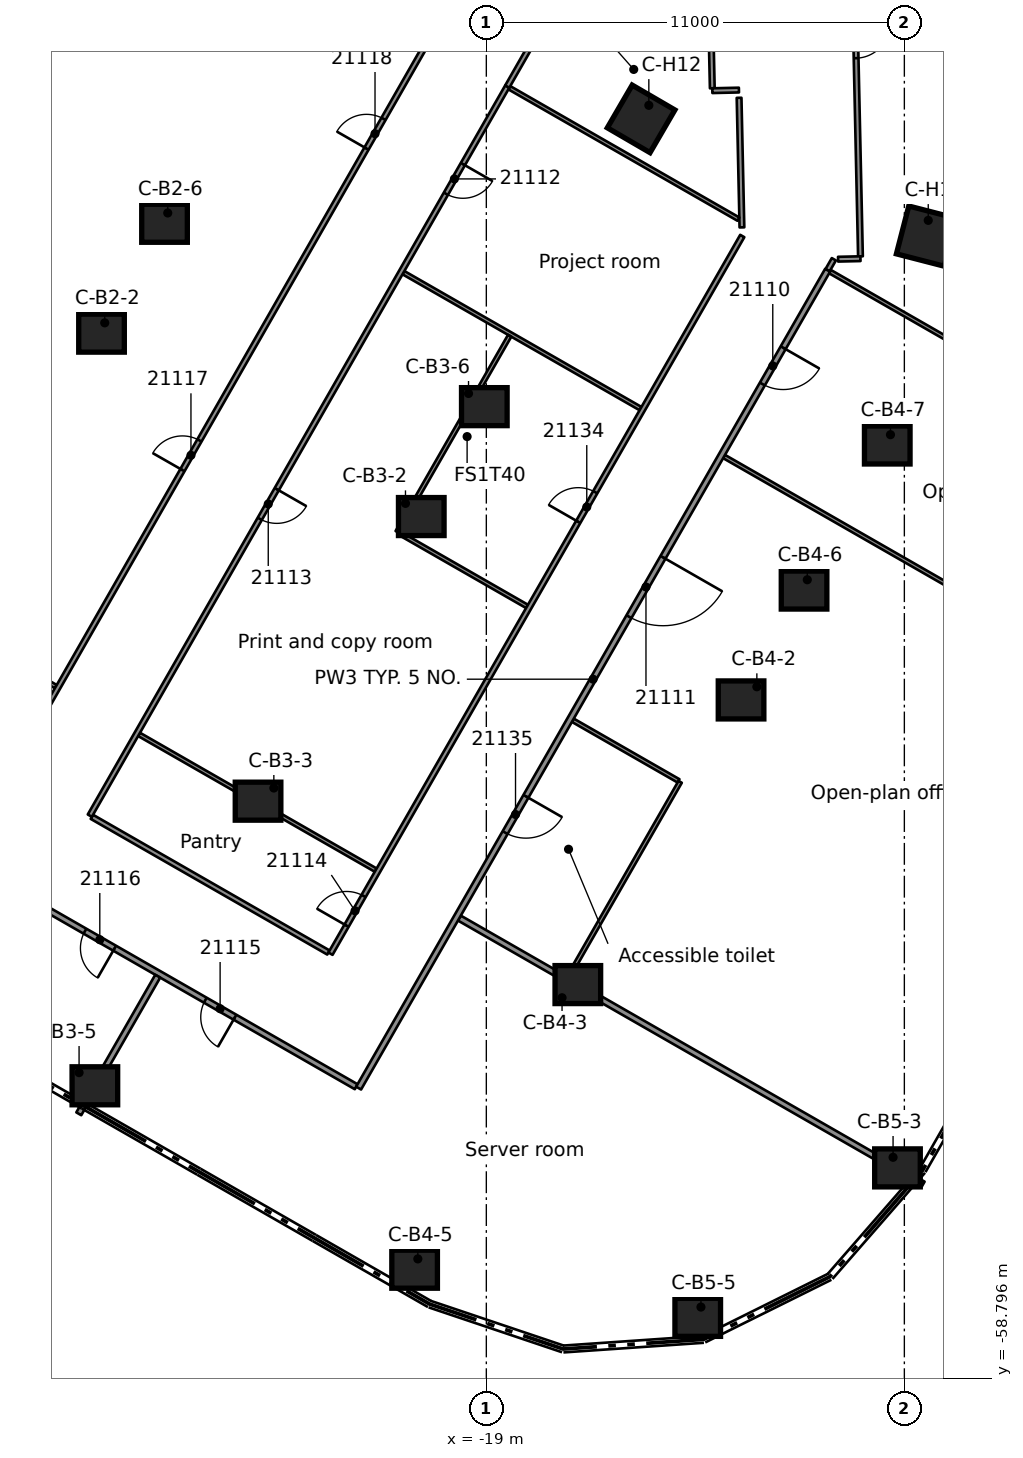
"""IFC4 building model, lengths in metres.
Left out: names, types, materials, properties, quantities, classifications, styles, units other than length and angle.
Written with IfcOpenShell. Run it as: python <this file> out.ifc"""

import sys

from ifc_helpers import new_model, si_unit, direction, frame, frame_2d, origin, origin_2d, place, context, subcontext, project, spatial, rectangle, extrude, element, fill, save


model = new_model("IFC4")
c1 = context("Model", 3, precision=1e-05, world=origin(), true_north=direction((0.0, 1.0)))
c2 = subcontext(c1, "Body", "Model", "MODEL_VIEW")
j1 = project(units=[si_unit("LENGTHUNIT", "METRE"), si_unit("PLANEANGLEUNIT", "RADIAN")], contexts=[c1])
p1 = place(None, origin())
s1 = spatial("IfcSite", under=j1, at=p1, CompositionType="ELEMENT")
p2 = place(p1, origin())
s2 = spatial("IfcBuilding", under=s1, at=p2, CompositionType="ELEMENT")
p3 = place(p2, frame((0.0, 0.0, 105.7)))
s3 = spatial("IfcBuildingStorey", under=s2, at=p3, CompositionType="ELEMENT", Elevation=105.7)
for number, where, z_axis, x_axis in (
    (1, (-29.126, -31.29, 0.0), (0.0, 0.0, 1.0), (1.0, 0.0, 0.0)),
    (2, (-27.468, -28.399, 0.0), (0.0, 0.0, 1.0), (1.0, 0.0, 0.0)),
    (3, (-20.712, -36.116, 0.0), (0.0, 0.0, 1.0), (1.0, 0.0, 0.0)),
    (4, (-25.007, -43.605, 0.0), (0.0, 0.0, 1.0), (1.0, 0.0, 0.0)),
    (5, (-29.301, -51.094, 0.0), (0.0, 0.0, 1.0), (1.0, 0.0, 0.0)),
    (6, (-19.053, -33.224, 0.0), (0.0, 0.0, 1.0), (1.0, 0.0, 0.0)),
    (7, (-12.297, -40.941, 0.0), (0.0, 0.0, 1.0), (1.0, 0.0, 0.0)),
    (8, (-16.592, -48.431, 0.0), (0.0, 0.0, 1.0), (1.0, 0.0, 0.0)),
    (9, (-20.887, -55.92, 0.0), (0.0, 0.0, 1.0), (1.0, 0.0, 0.0)),
    (10, (-10.639, -38.05, 0.0), (0.0, 0.0, 1.0), (1.0, 0.0, 0.0)),
    (11, (-8.45, -34.233, 0.0), (0.0, 0.0, 1.0), (1.0, 0.0, 0.0)),
    (12, (-8.181, -53.254, 0.0), (0.0, 0.0, 1.0), (1.0, 0.0, 0.0)),
    (13, (-13.437, -57.187, 0.0), (0.0, 0.0, 1.0), (1.0, 0.0, 0.0)),
):
    element("IfcColumn", number, at=place(p3, frame(where, z_axis=z_axis, x_axis=x_axis)), inside=s3, PredefinedType="COLUMN", context=c2, shape_type="SweptSolid", body=[
        extrude(rectangle(XDim=1.2, YDim=1.0, at=origin_2d()), origin(), (0.0, 0.0, 1.0), 3.5),
    ])
for number, where, z_axis, x_axis in (
    (14, (-7.417, -28.737, 0.0), (0.0, 0.0, 1.0), (-0.25, -0.968, 0.0)),
    (15, (-14.927, -25.652, 0.0), (0.0, 0.0, 1.0), (-0.503, -0.864, 0.0)),
):
    element("IfcColumn", number, at=place(p3, frame(where, z_axis=z_axis, x_axis=x_axis)), inside=s3, PredefinedType="COLUMN", context=c2, shape_type="SweptSolid", body=[
        extrude(rectangle(XDim=1.3, YDim=1.3, at=origin_2d()), origin(), (0.0, 0.0, 1.0), 3.5),
    ])
p4 = place(p3, frame((-13.054, -24.847, 0.0), z_axis=(0.0, 0.0, 1.0), x_axis=(-0.022053458667, 0.999756792906, 0.0)))
e16 = element("IfcWall", 16, at=p4, inside=s3, PredefinedType="PARTITIONING", context=c2, shape_type="SweptSolid", body=[
    extrude(rectangle(XDim=6.709, YDim=0.125, at=frame_2d((3.354, 0.0))), origin(), (0.0, 0.0, 1.0), 3.08),
])
p5 = place(p4, frame((2.788, 0.0, 0.0)))
e17 = element("IfcOpeningElement", 17, at=p5, cuts=e16, PredefinedType="OPENING", context=c2, shape_type="SweptSolid", body=[
    extrude(rectangle(XDim=1.0, YDim=2.1, at=frame_2d((0.5, 1.05))), frame((0.0, 0.073, 0.0), z_axis=(0.0, -1.0, 0.0), x_axis=(1.0, 0.0, 0.0)), (0.0, 0.0, 1.0), 0.145),
])
p6 = place(p3, frame((-12.274, -28.507, 0.0), z_axis=(0.0, 0.0, 1.0), x_axis=(-0.022051353947, 0.999756839331, 0.0)))
e18 = element("IfcWall", 18, at=p6, inside=s3, PredefinedType="PARTITIONING", context=c2, shape_type="SweptSolid", body=[
    extrude(rectangle(XDim=3.41, YDim=0.125, at=frame_2d((1.705, 0.0))), origin(), (0.0, 0.0, 1.0), 3.08),
])
p7 = place(p3, frame((-9.467, -15.062, 0.0), z_axis=(0.0, 0.0, 1.0), x_axis=(0.021956487302, -0.999758927275, 0.0)))
e19 = element("IfcWall", 19, at=p7, inside=s3, PredefinedType="PARTITIONING", context=c2, shape_type="SweptSolid", body=[
    extrude(rectangle(XDim=14.21, YDim=0.125, at=frame_2d((7.105, 0.0))), origin(), (0.0, 0.0, 1.0), 3.08),
])
p8 = place(p7, frame((8.095, 0.0, 0.0)))
e20 = element("IfcOpeningElement", 20, at=p8, cuts=e19, PredefinedType="OPENING", context=c2, shape_type="SweptSolid", body=[
    extrude(rectangle(XDim=0.9, YDim=2.1, at=frame_2d((0.45, 1.05))), frame((0.0, 0.073, 0.0), z_axis=(0.0, -1.0, 0.0), x_axis=(1.0, 0.0, 0.0)), (0.0, 0.0, 1.0), 0.145),
])
p9 = place(p3, frame((-22.424, -51.119, 0.0), z_axis=(0.0, 0.0, 1.0), x_axis=(-0.867497896771, 0.497440849849, 0.0)))
e21 = element("IfcWall", 21, at=p9, inside=s3, PredefinedType="PARTITIONING", context=c2, shape_type="SweptSolid", body=[
    extrude(rectangle(XDim=9.629, YDim=0.15, at=frame_2d((4.814, 0.0))), origin(), (0.0, 0.0, 1.0), 3.08),
])
p10 = place(p9, frame((3.678, 0.0, 0.0)))
e22 = element("IfcOpeningElement", 22, at=p10, cuts=e21, PredefinedType="OPENING", context=c2, shape_type="SweptSolid", body=[
    extrude(rectangle(XDim=0.9, YDim=2.1, at=frame_2d((0.45, 1.05))), frame((0.0, 0.085, 0.0), z_axis=(0.0, -1.0, 0.0), x_axis=(1.0, 0.0, 0.0)), (0.0, 0.0, 1.0), 0.17),
])
p11 = place(p9, frame((7.328, 0.0, 0.0)))
e23 = element("IfcOpeningElement", 23, at=p11, cuts=e21, PredefinedType="OPENING", context=c2, shape_type="SweptSolid", body=[
    extrude(rectangle(XDim=0.9, YDim=2.1, at=frame_2d((0.45, 1.05))), frame((0.0, 0.085, 0.0), z_axis=(0.0, -1.0, 0.0), x_axis=(1.0, 0.0, 0.0)), (0.0, 0.0, 1.0), 0.17),
])
p12 = place(p3, frame((-29.38, -44.017, 0.0), z_axis=(0.0, 0.0, 1.0), x_axis=(0.867475811481, -0.497479362885, 0.0)))
e24 = element("IfcWall", 24, at=p12, inside=s3, PredefinedType="PARTITIONING", context=c2, shape_type="SweptSolid", body=[
    extrude(rectangle(XDim=7.176, YDim=0.125, at=frame_2d((3.588, 0.0))), origin(), (0.0, 0.0, 1.0), 3.08),
])
p13 = place(p3, frame((-42.542, -33.587, 0.0), z_axis=(0.0, 0.0, 1.0), x_axis=(0.867466270896, -0.497495998835, 0.0)))
e25 = element("IfcWall", 25, at=p13, inside=s3, PredefinedType="PARTITIONING", context=c2, shape_type="SweptSolid", body=[
    extrude(rectangle(XDim=14.079, YDim=0.1, at=frame_2d((7.04, 0.0))), origin(), (0.0, 0.0, 1.0), 3.08),
])
p14 = place(p3, frame((-28.138, -41.848, 0.0), z_axis=(0.0, 0.0, 1.0), x_axis=(0.867478179125, -0.4974752343, 0.0)))
e26 = element("IfcWall", 26, at=p14, inside=s3, PredefinedType="PARTITIONING", context=c2, shape_type="SweptSolid", body=[
    extrude(rectangle(XDim=7.178, YDim=0.1, at=frame_2d((3.589, 0.0))), origin(), (0.0, 0.0, 1.0), 3.08),
])
p15 = place(p3, frame((-19.709, -46.681, 0.0), z_axis=(0.0, 0.0, 1.0), x_axis=(0.867456145265, -0.497513654126, 0.0)))
e27 = element("IfcWall", 27, at=p15, inside=s3, PredefinedType="PARTITIONING", context=c2, shape_type="SweptSolid", body=[
    extrude(rectangle(XDim=14.07, YDim=0.15, at=frame_2d((7.035, 0.0))), origin(), (0.0, 0.0, 1.0), 3.08),
])
p16 = place(p3, frame((-16.724, -41.476, 0.0), z_axis=(0.0, 0.0, 1.0), x_axis=(0.867553640943, -0.497343623752, 0.0)))
e28 = element("IfcWall", 28, at=p16, inside=s3, PredefinedType="PARTITIONING", context=c2, shape_type="SweptSolid", body=[
    extrude(rectangle(XDim=3.207, YDim=0.1, at=frame_2d((1.604, 0.0))), origin(), (0.0, 0.0, 1.0), 3.08),
])
p17 = place(p3, frame((-21.302, -36.546, 0.0), z_axis=(0.0, 0.0, 1.0), x_axis=(0.867492112241, -0.49745093748, 0.0)))
e29 = element("IfcWall", 29, at=p17, inside=s3, PredefinedType="PARTITIONING", context=c2, shape_type="SweptSolid", body=[
    extrude(rectangle(XDim=3.886, YDim=0.1, at=frame_2d((1.943, 0.0))), origin(), (0.0, 0.0, 1.0), 3.08),
])
p18 = place(p3, frame((-21.181, -29.699, 0.0), z_axis=(0.0, 0.0, 1.0), x_axis=(0.867554846835, -0.497341520219, 0.0)))
e30 = element("IfcWall", 30, at=p18, inside=s3, PredefinedType="PARTITIONING", context=c2, shape_type="SweptSolid", body=[
    extrude(rectangle(XDim=7.19, YDim=0.1, at=frame_2d((3.595, 0.0))), origin(), (0.0, 0.0, 1.0), 3.08),
])
p19 = place(p3, frame((-12.745, -34.536, 0.0), z_axis=(0.0, 0.0, 1.0), x_axis=(0.867470957273, -0.497487827277, 0.0)))
e31 = element("IfcWall", 31, at=p19, inside=s3, PredefinedType="PARTITIONING", context=c2, shape_type="SweptSolid", body=[
    extrude(rectangle(XDim=14.125, YDim=0.1, at=frame_2d((7.062, 0.0))), origin(), (0.0, 0.0, 1.0), 3.08),
])
p20 = place(p3, frame((-18.395, -24.833, 0.0), z_axis=(0.0, 0.0, 1.0), x_axis=(0.86747241126, -0.497485291946, 0.0)))
e32 = element("IfcWall", 32, at=p20, inside=s3, PredefinedType="PARTITIONING", context=c2, shape_type="SweptSolid", body=[
    extrude(rectangle(XDim=6.949, YDim=0.1, at=frame_2d((3.475, 0.0))), origin(), (0.0, 0.0, 1.0), 3.08),
])
p21 = place(p3, frame((-9.956, -29.672, 0.0), z_axis=(0.0, 0.0, 1.0), x_axis=(0.867495524847, -0.497444986276, 0.0)))
e33 = element("IfcWall", 33, at=p21, inside=s3, PredefinedType="PARTITIONING", context=c2, shape_type="SweptSolid", body=[
    extrude(rectangle(XDim=14.126, YDim=0.1, at=frame_2d((7.063, 0.0))), origin(), (0.0, 0.0, 1.0), 3.08),
])
p22 = place(p3, frame((-9.744, -29.344, 0.0), z_axis=(0.0, 0.0, 1.0), x_axis=(0.999758670784, 0.021968163164, 0.0)))
e34 = element("IfcWall", 34, at=p22, inside=s3, PredefinedType="PARTITIONING", context=c2, shape_type="SweptSolid", body=[
    extrude(rectangle(XDim=0.589, YDim=0.125, at=frame_2d((0.294, 0.0))), origin(), (0.0, 0.0, 1.0), 3.08),
])
p23 = place(p3, frame((-13.053, -24.91, 0.0), z_axis=(0.0, 0.0, 1.0), x_axis=(0.999743094177, 0.022665957838, 0.0)))
e35 = element("IfcWall", 35, at=p23, inside=s3, PredefinedType="PARTITIONING", context=c2, shape_type="SweptSolid", body=[
    extrude(rectangle(XDim=0.7, YDim=0.125, at=frame_2d((0.35, 0.0))), origin(), (0.0, 0.0, 1.0), 3.08),
])
p24 = place(p3, frame((-10.021, -29.635, 0.0), z_axis=(0.0, 0.0, 1.0), x_axis=(0.498030726652, 0.867159382876, 0.0)))
e36 = element("IfcWall", 36, at=p24, inside=s3, PredefinedType="PARTITIONING", context=c2, shape_type="SweptSolid", body=[
    extrude(rectangle(XDim=0.333, YDim=0.125, at=frame_2d((0.167, 0.0))), origin(), (0.0, 0.0, 1.0), 3.08),
])
p25 = place(p3, frame((-16.847, -48.236, 0.0), z_axis=(0.0, 0.0, 1.0), x_axis=(0.497509382409, 0.867458595217, 0.0)))
e37 = element("IfcWall", 37, at=p25, inside=s3, PredefinedType="PARTITIONING", context=c2, shape_type="SweptSolid", body=[
    extrude(rectangle(XDim=5.926, YDim=0.1, at=frame_2d((2.963, 0.0))), origin(), (0.0, 0.0, 1.0), 3.08),
])
p26 = place(p3, frame((-10.02, -29.636, 0.0), z_axis=(0.0, 0.0, 1.0), x_axis=(-0.49748968286, -0.867469893107, 0.0)))
e38 = element("IfcWall", 38, at=p26, inside=s3, PredefinedType="PARTITIONING", context=c2, shape_type="SweptSolid", body=[
    extrude(rectangle(XDim=24.807, YDim=0.15, at=frame_2d((12.403, 0.0))), origin(), (0.0, 0.0, 1.0), 3.08),
])
p27 = place(p26, frame((2.35, 0.0, 0.0)))
e39 = element("IfcOpeningElement", 39, at=p27, cuts=e38, PredefinedType="OPENING", context=c2, shape_type="SweptSolid", body=[
    extrude(rectangle(XDim=1.1, YDim=2.1, at=frame_2d((0.55, 1.05))), frame((0.0, 0.085, 0.0), z_axis=(0.0, -1.0, 0.0), x_axis=(1.0, 0.0, 0.0)), (0.0, 0.0, 1.0), 0.17),
])
p28 = place(p26, frame((8.707, 0.0, 0.0)))
e40 = element("IfcOpeningElement", 40, at=p28, cuts=e38, PredefinedType="OPENING", context=c2, shape_type="SweptSolid", body=[
    extrude(rectangle(XDim=1.8, YDim=2.1, at=frame_2d((0.9, 1.05))), frame((0.0, 0.085, 0.0), z_axis=(0.0, -1.0, 0.0), x_axis=(1.0, 0.0, 0.0)), (0.0, 0.0, 1.0), 0.17),
])
p29 = place(p26, frame((15.957, 0.0, 0.0)))
e41 = element("IfcOpeningElement", 41, at=p29, cuts=e38, PredefinedType="OPENING", context=c2, shape_type="SweptSolid", body=[
    extrude(rectangle(XDim=1.1, YDim=2.1, at=frame_2d((0.55, 1.05))), frame((0.0, 0.085, 0.0), z_axis=(0.0, -1.0, 0.0), x_axis=(1.0, 0.0, 0.0)), (0.0, 0.0, 1.0), 0.17),
])
p30 = place(p3, frame((-23.101, -47.618, 0.0), z_axis=(0.0, 0.0, 1.0), x_axis=(0.497706797126, 0.867345343041, 0.0)))
e42 = element("IfcWall", 42, at=p30, inside=s3, PredefinedType="PARTITIONING", context=c2, shape_type="SweptSolid", body=[
    extrude(rectangle(XDim=21.772, YDim=0.125, at=frame_2d((10.886, 0.0))), origin(), (0.0, 0.0, 1.0), 3.08),
])
p31 = place(p30, frame((0.85, 0.0, 0.0)))
e43 = element("IfcOpeningElement", 43, at=p31, cuts=e42, PredefinedType="OPENING", context=c2, shape_type="SweptSolid", body=[
    extrude(rectangle(XDim=0.9, YDim=2.1, at=frame_2d((0.45, 1.05))), frame((0.0, 0.073, 0.0), z_axis=(0.0, -1.0, 0.0), x_axis=(1.0, 0.0, 0.0)), (0.0, 0.0, 1.0), 0.145),
])
p32 = place(p30, frame((13.1, 0.0, 0.0)))
e44 = element("IfcOpeningElement", 44, at=p32, cuts=e42, PredefinedType="OPENING", context=c2, shape_type="SweptSolid", body=[
    extrude(rectangle(XDim=0.9, YDim=2.1, at=frame_2d((0.45, 1.05))), frame((0.0, 0.073, 0.0), z_axis=(0.0, -1.0, 0.0), x_axis=(1.0, 0.0, 0.0)), (0.0, 0.0, 1.0), 0.145),
])
p33 = place(p3, frame((-29.724, -51.831, 0.0), z_axis=(0.0, 0.0, 1.0), x_axis=(0.49757424492, 0.867421391708, 0.0)))
e45 = element("IfcWall", 45, at=p33, inside=s3, PredefinedType="PARTITIONING", context=c2, shape_type="SweptSolid", body=[
    extrude(rectangle(XDim=4.175, YDim=0.15, at=frame_2d((2.087, 0.0))), origin(), (0.0, 0.0, 1.0), 3.08),
])
p34 = place(p3, frame((-21.345, -36.521, 0.0), z_axis=(0.0, 0.0, 1.0), x_axis=(0.497305055322, 0.867575749978, 0.0)))
e46 = element("IfcWall", 46, at=p34, inside=s3, PredefinedType="PARTITIONING", context=c2, shape_type="SweptSolid", body=[
    extrude(rectangle(XDim=5.95, YDim=0.1, at=frame_2d((2.975, 0.0))), origin(), (0.0, 0.0, 1.0), 3.08),
])
p35 = place(p3, frame((-18.449, -24.802, 0.0), z_axis=(0.0, 0.0, 1.0), x_axis=(-0.496915373234, -0.867799004288, 0.0)))
e47 = element("IfcWall", 47, at=p35, inside=s3, PredefinedType="PARTITIONING", context=c2, shape_type="SweptSolid", body=[
    extrude(rectangle(XDim=22.107, YDim=0.125, at=frame_2d((11.053, 0.0))), origin(), (0.0, 0.0, 1.0), 3.08),
])
p36 = place(p35, frame((2.35, 0.0, 0.0)))
e48 = element("IfcOpeningElement", 48, at=p36, cuts=e47, PredefinedType="OPENING", context=c2, shape_type="SweptSolid", body=[
    extrude(rectangle(XDim=0.9, YDim=2.1, at=frame_2d((0.45, 1.05))), frame((0.0, 0.073, 0.0), z_axis=(0.0, -1.0, 0.0), x_axis=(1.0, 0.0, 0.0)), (0.0, 0.0, 1.0), 0.145),
])
p37 = place(p35, frame((12.207, 0.0, 0.0)))
e49 = element("IfcOpeningElement", 49, at=p37, cuts=e47, PredefinedType="OPENING", context=c2, shape_type="SweptSolid", body=[
    extrude(rectangle(XDim=0.9, YDim=2.1, at=frame_2d((0.45, 1.05))), frame((0.0, 0.073, 0.0), z_axis=(0.0, -1.0, 0.0), x_axis=(1.0, 0.0, 0.0)), (0.0, 0.0, 1.0), 0.145),
])
p38 = place(p3, frame((-18.449, -24.802, 0.0), z_axis=(0.0, 0.0, 1.0), x_axis=(0.49675090032, 0.867893163374, 0.0)))
e50 = element("IfcWall", 50, at=p38, inside=s3, PredefinedType="PARTITIONING", context=c2, shape_type="SweptSolid", body=[
    extrude(rectangle(XDim=2.148, YDim=0.125, at=frame_2d((1.074, 0.0))), origin(), (0.0, 0.0, 1.0), 3.08),
])
p39 = place(p3, frame((-32.859, -45.136, 0.0), z_axis=(0.0, 0.0, 1.0), x_axis=(0.496796975504, 0.867866789969, 0.0)))
e51 = element("IfcWall", 51, at=p39, inside=s3, PredefinedType="PARTITIONING", context=c2, shape_type="SweptSolid", body=[
    extrude(rectangle(XDim=24.807, YDim=0.125, at=frame_2d((12.403, 0.0))), origin(), (0.0, 0.0, 1.0), 3.08),
])
p40 = place(p39, frame((11.801, 0.0, 0.0)))
e52 = element("IfcOpeningElement", 52, at=p40, cuts=e51, PredefinedType="OPENING", context=c2, shape_type="SweptSolid", body=[
    extrude(rectangle(XDim=0.9, YDim=2.1, at=frame_2d((0.45, 1.05))), frame((0.0, 0.073, 0.0), z_axis=(0.0, -1.0, 0.0), x_axis=(1.0, 0.0, 0.0)), (0.0, 0.0, 1.0), 0.145),
])
p41 = place(p39, frame((21.551, 0.0, 0.0)))
e53 = element("IfcOpeningElement", 53, at=p41, cuts=e51, PredefinedType="OPENING", context=c2, shape_type="SweptSolid", body=[
    extrude(rectangle(XDim=0.9, YDim=2.1, at=frame_2d((0.45, 1.05))), frame((0.0, 0.073, 0.0), z_axis=(0.0, -1.0, 0.0), x_axis=(1.0, 0.0, 0.0)), (0.0, 0.0, 1.0), 0.145),
])
p42 = place(p27, origin())
e54 = element("IfcDoor", 54, at=p42, inside=s3, OperationType="SINGLE_SWING_LEFT", PredefinedType="DOOR", context=c2, shape_type="SweptSolid", body=[
    extrude(rectangle(XDim=1.1, YDim=2.1, at=frame_2d((0.55, 1.05))), frame((0.0, 0.025, 0.0), z_axis=(0.0, -1.0, 0.0), x_axis=(1.0, 0.0, 0.0)), (0.0, 0.0, 1.0), 0.05),
])
fill(e39, e54)
p43 = place(p28, origin())
e55 = element("IfcDoor", 55, at=p43, inside=s3, OperationType="DOUBLE_DOOR_SINGLE_SWING", PredefinedType="DOOR", context=c2, shape_type="SweptSolid", body=[
    extrude(rectangle(XDim=1.8, YDim=2.1, at=frame_2d((0.9, 1.05))), frame((0.0, 0.025, 0.0), z_axis=(0.0, -1.0, 0.0), x_axis=(1.0, 0.0, 0.0)), (0.0, 0.0, 1.0), 0.05),
])
fill(e40, e55)
p44 = place(p36, origin())
e56 = element("IfcDoor", 56, at=p44, inside=s3, OperationType="SINGLE_SWING_LEFT", PredefinedType="DOOR", context=c2, shape_type="SweptSolid", body=[
    extrude(rectangle(XDim=0.9, YDim=2.1, at=frame_2d((0.45, 1.05))), frame((0.0, 0.025, 0.0), z_axis=(0.0, -1.0, 0.0), x_axis=(1.0, 0.0, 0.0)), (0.0, 0.0, 1.0), 0.05),
])
fill(e48, e56)
p45 = place(p37, origin())
e57 = element("IfcDoor", 57, at=p45, inside=s3, OperationType="SINGLE_SWING_RIGHT", PredefinedType="DOOR", context=c2, shape_type="SweptSolid", body=[
    extrude(rectangle(XDim=0.9, YDim=2.1, at=frame_2d((0.45, 1.05))), frame((0.0, 0.025, 0.0), z_axis=(0.0, -1.0, 0.0), x_axis=(1.0, 0.0, 0.0)), (0.0, 0.0, 1.0), 0.05),
])
fill(e49, e57)
p46 = place(p31, origin())
e58 = element("IfcDoor", 58, at=p46, inside=s3, OperationType="SINGLE_SWING_LEFT", PredefinedType="DOOR", context=c2, shape_type="SweptSolid", body=[
    extrude(rectangle(XDim=0.9, YDim=2.1, at=frame_2d((0.45, 1.05))), frame((0.0, 0.025, 0.0), z_axis=(0.0, -1.0, 0.0), x_axis=(1.0, 0.0, 0.0)), (0.0, 0.0, 1.0), 0.05),
])
fill(e43, e58)
p47 = place(p10, origin())
e59 = element("IfcDoor", 59, at=p47, inside=s3, OperationType="SINGLE_SWING_LEFT", PredefinedType="DOOR", context=c2, shape_type="SweptSolid", body=[
    extrude(rectangle(XDim=0.9, YDim=2.1, at=frame_2d((0.45, 1.05))), frame((0.0, 0.025, 0.0), z_axis=(0.0, -1.0, 0.0), x_axis=(1.0, 0.0, 0.0)), (0.0, 0.0, 1.0), 0.05),
])
fill(e22, e59)
p48 = place(p11, origin())
e60 = element("IfcDoor", 60, at=p48, inside=s3, OperationType="SINGLE_SWING_RIGHT", PredefinedType="DOOR", context=c2, shape_type="SweptSolid", body=[
    extrude(rectangle(XDim=0.9, YDim=2.1, at=frame_2d((0.45, 1.05))), frame((0.0, 0.025, 0.0), z_axis=(0.0, -1.0, 0.0), x_axis=(1.0, 0.0, 0.0)), (0.0, 0.0, 1.0), 0.05),
])
fill(e23, e60)
p49 = place(p40, origin())
e61 = element("IfcDoor", 61, at=p49, inside=s3, OperationType="SINGLE_SWING_LEFT", PredefinedType="DOOR", context=c2, shape_type="SweptSolid", body=[
    extrude(rectangle(XDim=0.9, YDim=2.1, at=frame_2d((0.45, 1.05))), frame((0.0, 0.025, 0.0), z_axis=(0.0, -1.0, 0.0), x_axis=(1.0, 0.0, 0.0)), (0.0, 0.0, 1.0), 0.05),
])
fill(e52, e61)
p50 = place(p41, origin())
e62 = element("IfcDoor", 62, at=p50, inside=s3, OperationType="SINGLE_SWING_RIGHT", PredefinedType="DOOR", context=c2, shape_type="SweptSolid", body=[
    extrude(rectangle(XDim=0.9, YDim=2.1, at=frame_2d((0.45, 1.05))), frame((0.0, 0.025, 0.0), z_axis=(0.0, -1.0, 0.0), x_axis=(1.0, 0.0, 0.0)), (0.0, 0.0, 1.0), 0.05),
])
fill(e53, e62)
p51 = place(p8, origin())
e63 = element("IfcDoor", 63, at=p51, inside=s3, OperationType="SINGLE_SWING_RIGHT", PredefinedType="DOOR", context=c2, shape_type="SweptSolid", body=[
    extrude(rectangle(XDim=0.9, YDim=2.1, at=frame_2d((0.45, 1.05))), frame((0.0, 0.025, 0.0), z_axis=(0.0, -1.0, 0.0), x_axis=(1.0, 0.0, 0.0)), (0.0, 0.0, 1.0), 0.05),
])
fill(e20, e63)
p52 = place(p32, origin())
e64 = element("IfcDoor", 64, at=p52, inside=s3, OperationType="SINGLE_SWING_RIGHT", PredefinedType="DOOR", context=c2, shape_type="SweptSolid", body=[
    extrude(rectangle(XDim=0.9, YDim=2.1, at=frame_2d((0.45, 1.05))), frame((0.0, 0.025, 0.0), z_axis=(0.0, -1.0, 0.0), x_axis=(1.0, 0.0, 0.0)), (0.0, 0.0, 1.0), 0.05),
])
fill(e44, e64)
p53 = place(p29, origin())
e65 = element("IfcDoor", 65, at=p53, inside=s3, OperationType="SINGLE_SWING_RIGHT", PredefinedType="DOOR", context=c2, shape_type="SweptSolid", body=[
    extrude(rectangle(XDim=1.1, YDim=2.1, at=frame_2d((0.55, 1.05))), frame((0.0, 0.025, 0.0), z_axis=(0.0, -1.0, 0.0), x_axis=(1.0, 0.0, 0.0)), (0.0, 0.0, 1.0), 0.05),
])
fill(e41, e65)
save(model, sys.argv[1])
